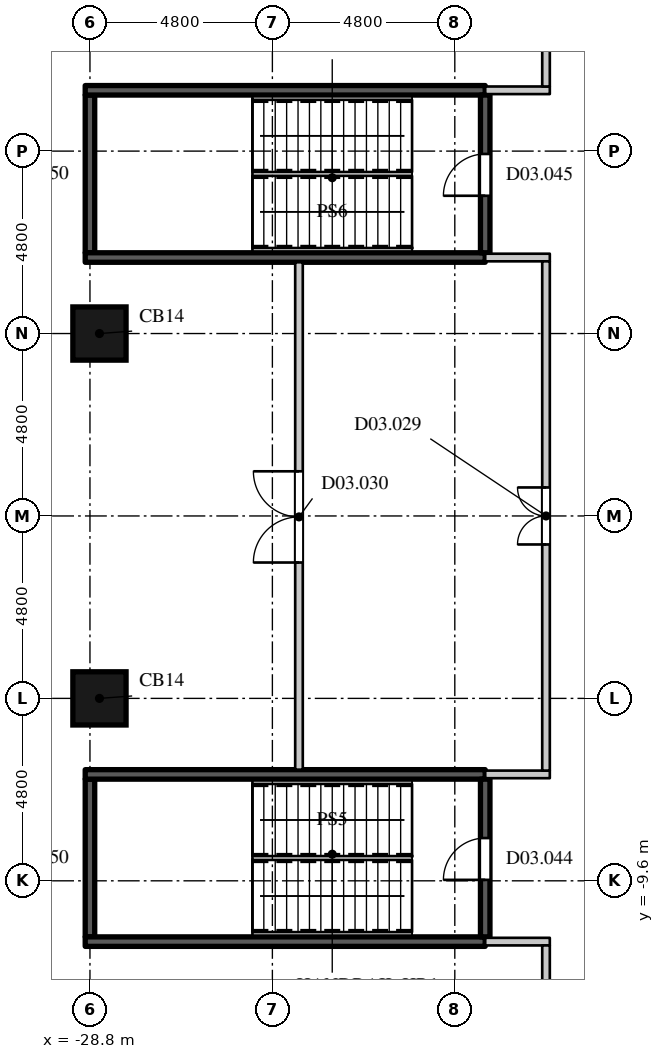
"""IFC4 building model, lengths in metres.
Left out: names, types, materials, properties, quantities, classifications, styles, units other than length and angle.
Written with IfcOpenShell. Run it as: python <this file> out.ifc"""

import sys

from ifc_helpers import new_model, si_unit, direction, frame, frame_2d, origin, origin_2d, place, context, subcontext, project, spatial, rectangle, extrude, element, fill, save


model = new_model("IFC4")
c1 = context("Model", 3, precision=1e-05, world=origin(), true_north=direction((0.0, 1.0)))
c2 = subcontext(c1, "Body", "Model", "MODEL_VIEW")
j1 = project(units=[si_unit("LENGTHUNIT", "METRE"), si_unit("PLANEANGLEUNIT", "RADIAN")], contexts=[c1])
p1 = place(None, origin())
s1 = spatial("IfcSite", under=j1, at=p1, CompositionType="ELEMENT")
p2 = place(p1, origin())
s2 = spatial("IfcBuilding", under=s1, at=p2, CompositionType="ELEMENT")
p3 = place(p2, frame((0.0, 0.0, 16.0)))
s3 = spatial("IfcBuildingStorey", under=s2, at=p3, CompositionType="ELEMENT", Elevation=16.0)
for number, where, z_axis, x_axis in (
    (1, (-28.55, -4.8, 0.0), (0.0, 0.0, 1.0), (0.0, -1.0, 0.0)),
    (2, (-28.55, 4.8, 0.0), (0.0, 0.0, 1.0), (0.0, -1.0, 0.0)),
):
    element("IfcColumn", number, at=place(p3, frame(where, z_axis=z_axis, x_axis=x_axis)), inside=s3, PredefinedType="COLUMN", context=c2, shape_type="SweptSolid", body=[
        extrude(rectangle(XDim=1.4, YDim=1.4, at=origin_2d()), origin(), (0.0, 0.0, 1.0), 5.0),
    ])
p4 = place(p3, frame((-23.3, -6.675, 0.0), z_axis=(0.0, 0.0, 1.0), x_axis=(0.0, 1.0, 0.0)))
e3 = element("IfcWall", 3, at=p4, inside=s3, PredefinedType="PARTITIONING", context=c2, shape_type="SweptSolid", body=[
    extrude(rectangle(XDim=13.35, YDim=0.2, at=frame_2d((6.675, 0.0))), origin(), (0.0, 0.0, 1.0), 4.4),
])
p5 = place(p4, frame((5.45, 0.0, 0.0)))
e4 = element("IfcOpeningElement", 4, at=p5, cuts=e3, PredefinedType="OPENING", context=c2, shape_type="SweptSolid", body=[
    extrude(rectangle(XDim=2.4, YDim=2.4, at=frame_2d((1.2, 1.2))), frame((0.0, 0.11, 0.0), z_axis=(0.0, -1.0, 0.0), x_axis=(1.0, 0.0, 0.0)), (0.0, 0.0, 1.0), 0.22),
])
for number, where, z_axis, x_axis in (
    (5, (-18.4, -11.2, 0.0), (0.0, 0.0, 1.0), (1.0, 0.0, 0.0)),
    (6, (-18.4, -6.8, 0.0), (0.0, 0.0, 1.0), (1.0, 0.0, 0.0)),
    (7, (-18.4, 6.8, 0.0), (0.0, 0.0, 1.0), (1.0, 0.0, 0.0)),
    (8, (-18.4, 11.2, 0.0), (0.0, 0.0, 1.0), (1.0, 0.0, 0.0)),
):
    element("IfcWall", number, at=place(p3, frame(where, z_axis=z_axis, x_axis=x_axis)), inside=s3, PredefinedType="PARTITIONING", context=c2, shape_type="SweptSolid", body=[
        extrude(rectangle(XDim=1.7, YDim=0.2, at=frame_2d((0.85, 0.0))), origin(), (0.0, 0.0, 1.0), 4.4),
    ])
p6 = place(p3, frame((-16.8, -13.894, 0.0), z_axis=(0.0, 0.0, 1.0), x_axis=(0.0, 1.0, 0.0)))
e9 = element("IfcWall", 9, at=p6, inside=s3, PredefinedType="PARTITIONING", context=c2, shape_type="SweptSolid", body=[
    extrude(rectangle(XDim=2.594, YDim=0.2, at=frame_2d((1.297, 0.0))), origin(), (0.0, 0.0, 1.0), 4.4),
])
p7 = place(p3, frame((-16.8, -6.7, 0.0), z_axis=(0.0, 0.0, 1.0), x_axis=(0.0, 1.0, 0.0)))
e10 = element("IfcWall", 10, at=p7, inside=s3, PredefinedType="PARTITIONING", context=c2, shape_type="SweptSolid", body=[
    extrude(rectangle(XDim=13.4, YDim=0.2, at=frame_2d((6.7, 0.0))), origin(), (0.0, 0.0, 1.0), 4.4),
])
p8 = place(p7, frame((5.95, 0.0, 0.0)))
e11 = element("IfcOpeningElement", 11, at=p8, cuts=e10, PredefinedType="OPENING", context=c2, shape_type="SweptSolid", body=[
    extrude(rectangle(XDim=1.5, YDim=2.4, at=frame_2d((0.75, 1.2))), frame((0.0, 0.11, 0.0), z_axis=(0.0, -1.0, 0.0), x_axis=(1.0, 0.0, 0.0)), (0.0, 0.0, 1.0), 0.22),
])
p9 = place(p3, frame((-16.8, 11.3, 0.0), z_axis=(0.0, 0.0, 1.0), x_axis=(0.0, 1.0, 0.0)))
e12 = element("IfcWall", 12, at=p9, inside=s3, PredefinedType="PARTITIONING", context=c2, shape_type="SweptSolid", body=[
    extrude(rectangle(XDim=3.937, YDim=0.2, at=frame_2d((1.968, 0.0))), origin(), (0.0, 0.0, 1.0), 4.4),
])
p10 = place(p3, frame((-28.8, -11.075, 0.0), z_axis=(0.0, 0.0, 1.0), x_axis=(0.0, 1.0, 0.0)))
e13 = element("IfcWall", 13, at=p10, inside=s3, PredefinedType="SHEAR", context=c2, shape_type="SweptSolid", body=[
    extrude(rectangle(XDim=4.15, YDim=0.25, at=frame_2d((2.075, 0.0))), origin(), (0.0, 0.0, 1.0), 4.65),
])
for number, where, z_axis, x_axis in (
    (14, (-28.925, -11.2, 0.0), (0.0, 0.0, 1.0), (1.0, 0.0, 0.0)),
    (15, (-28.925, -6.8, 0.0), (0.0, 0.0, 1.0), (1.0, 0.0, 0.0)),
):
    element("IfcWall", number, at=place(p3, frame(where, z_axis=z_axis, x_axis=x_axis)), inside=s3, PredefinedType="SHEAR", context=c2, shape_type="SweptSolid", body=[
        extrude(rectangle(XDim=10.525, YDim=0.25, at=frame_2d((5.263, 0.0))), origin(), (0.0, 0.0, 1.0), 4.65),
    ])
p11 = place(p3, frame((-28.8, 6.925, 0.0), z_axis=(0.0, 0.0, 1.0), x_axis=(0.0, 1.0, 0.0)))
e16 = element("IfcWall", 16, at=p11, inside=s3, PredefinedType="SHEAR", context=c2, shape_type="SweptSolid", body=[
    extrude(rectangle(XDim=4.15, YDim=0.25, at=frame_2d((2.075, 0.0))), origin(), (0.0, 0.0, 1.0), 4.65),
])
for number, where, z_axis, x_axis in (
    (17, (-28.925, 6.8, 0.0), (0.0, 0.0, 1.0), (1.0, 0.0, 0.0)),
    (18, (-28.925, 11.2, 0.0), (0.0, 0.0, 1.0), (1.0, 0.0, 0.0)),
):
    element("IfcWall", number, at=place(p3, frame(where, z_axis=z_axis, x_axis=x_axis)), inside=s3, PredefinedType="SHEAR", context=c2, shape_type="SweptSolid", body=[
        extrude(rectangle(XDim=10.525, YDim=0.25, at=frame_2d((5.263, 0.0))), origin(), (0.0, 0.0, 1.0), 4.65),
    ])
p12 = place(p3, frame((-18.4, -11.075, 0.0), z_axis=(0.0, 0.0, 1.0), x_axis=(0.0, 1.0, 0.0)))
e19 = element("IfcWall", 19, at=p12, inside=s3, PredefinedType="SHEAR", context=c2, shape_type="SweptSolid", body=[
    extrude(rectangle(XDim=4.15, YDim=0.25, at=frame_2d((2.075, 0.0))), origin(), (0.0, 0.0, 1.0), 4.65),
])
p13 = place(p12, frame((1.5, 0.0, 0.0)))
e20 = element("IfcOpeningElement", 20, at=p13, cuts=e19, PredefinedType="OPENING", context=c2, shape_type="SweptSolid", body=[
    extrude(rectangle(XDim=1.1, YDim=2.2, at=frame_2d((0.55, 1.1))), frame((0.0, 0.135, 0.0), z_axis=(0.0, -1.0, 0.0), x_axis=(1.0, 0.0, 0.0)), (0.0, 0.0, 1.0), 0.27),
])
p14 = place(p3, frame((-18.4, 6.925, 0.0), z_axis=(0.0, 0.0, 1.0), x_axis=(0.0, 1.0, 0.0)))
e21 = element("IfcWall", 21, at=p14, inside=s3, PredefinedType="SHEAR", context=c2, shape_type="SweptSolid", body=[
    extrude(rectangle(XDim=4.15, YDim=0.25, at=frame_2d((2.075, 0.0))), origin(), (0.0, 0.0, 1.0), 4.65),
])
p15 = place(p14, frame((1.5, 0.0, 0.0)))
e22 = element("IfcOpeningElement", 22, at=p15, cuts=e21, PredefinedType="OPENING", context=c2, shape_type="SweptSolid", body=[
    extrude(rectangle(XDim=1.1, YDim=2.2, at=frame_2d((0.55, 1.1))), frame((0.0, 0.135, 0.0), z_axis=(0.0, -1.0, 0.0), x_axis=(1.0, 0.0, 0.0)), (0.0, 0.0, 1.0), 0.27),
])
p16 = place(p8, origin())
e23 = element("IfcDoor", 23, at=p16, inside=s3, OperationType="DOUBLE_DOOR_SINGLE_SWING", PredefinedType="DOOR", context=c2, shape_type="SweptSolid", body=[
    extrude(rectangle(XDim=1.5, YDim=2.4, at=frame_2d((0.75, 1.2))), frame((0.0, 0.025, 0.0), z_axis=(0.0, -1.0, 0.0), x_axis=(1.0, 0.0, 0.0)), (0.0, 0.0, 1.0), 0.05),
])
fill(e11, e23)
p17 = place(p5, origin())
e24 = element("IfcDoor", 24, at=p17, inside=s3, OperationType="DOUBLE_DOOR_SINGLE_SWING", PredefinedType="DOOR", context=c2, shape_type="SweptSolid", body=[
    extrude(rectangle(XDim=2.4, YDim=2.4, at=frame_2d((1.2, 1.2))), frame((0.0, 0.025, 0.0), z_axis=(0.0, -1.0, 0.0), x_axis=(1.0, 0.0, 0.0)), (0.0, 0.0, 1.0), 0.05),
])
fill(e4, e24)
p18 = place(p13, origin())
e25 = element("IfcDoor", 25, at=p18, inside=s3, OperationType="SINGLE_SWING_LEFT", PredefinedType="DOOR", context=c2, shape_type="SweptSolid", body=[
    extrude(rectangle(XDim=1.1, YDim=2.2, at=frame_2d((0.55, 1.1))), frame((0.0, 0.025, 0.0), z_axis=(0.0, -1.0, 0.0), x_axis=(1.0, 0.0, 0.0)), (0.0, 0.0, 1.0), 0.05),
])
fill(e20, e25)
p19 = place(p15, origin())
e26 = element("IfcDoor", 26, at=p19, inside=s3, OperationType="SINGLE_SWING_LEFT", PredefinedType="DOOR", context=c2, shape_type="SweptSolid", body=[
    extrude(rectangle(XDim=1.1, YDim=2.2, at=frame_2d((0.55, 1.1))), frame((0.0, 0.025, 0.0), z_axis=(0.0, -1.0, 0.0), x_axis=(1.0, 0.0, 0.0)), (0.0, 0.0, 1.0), 0.05),
])
fill(e22, e26)
save(model, sys.argv[1])
